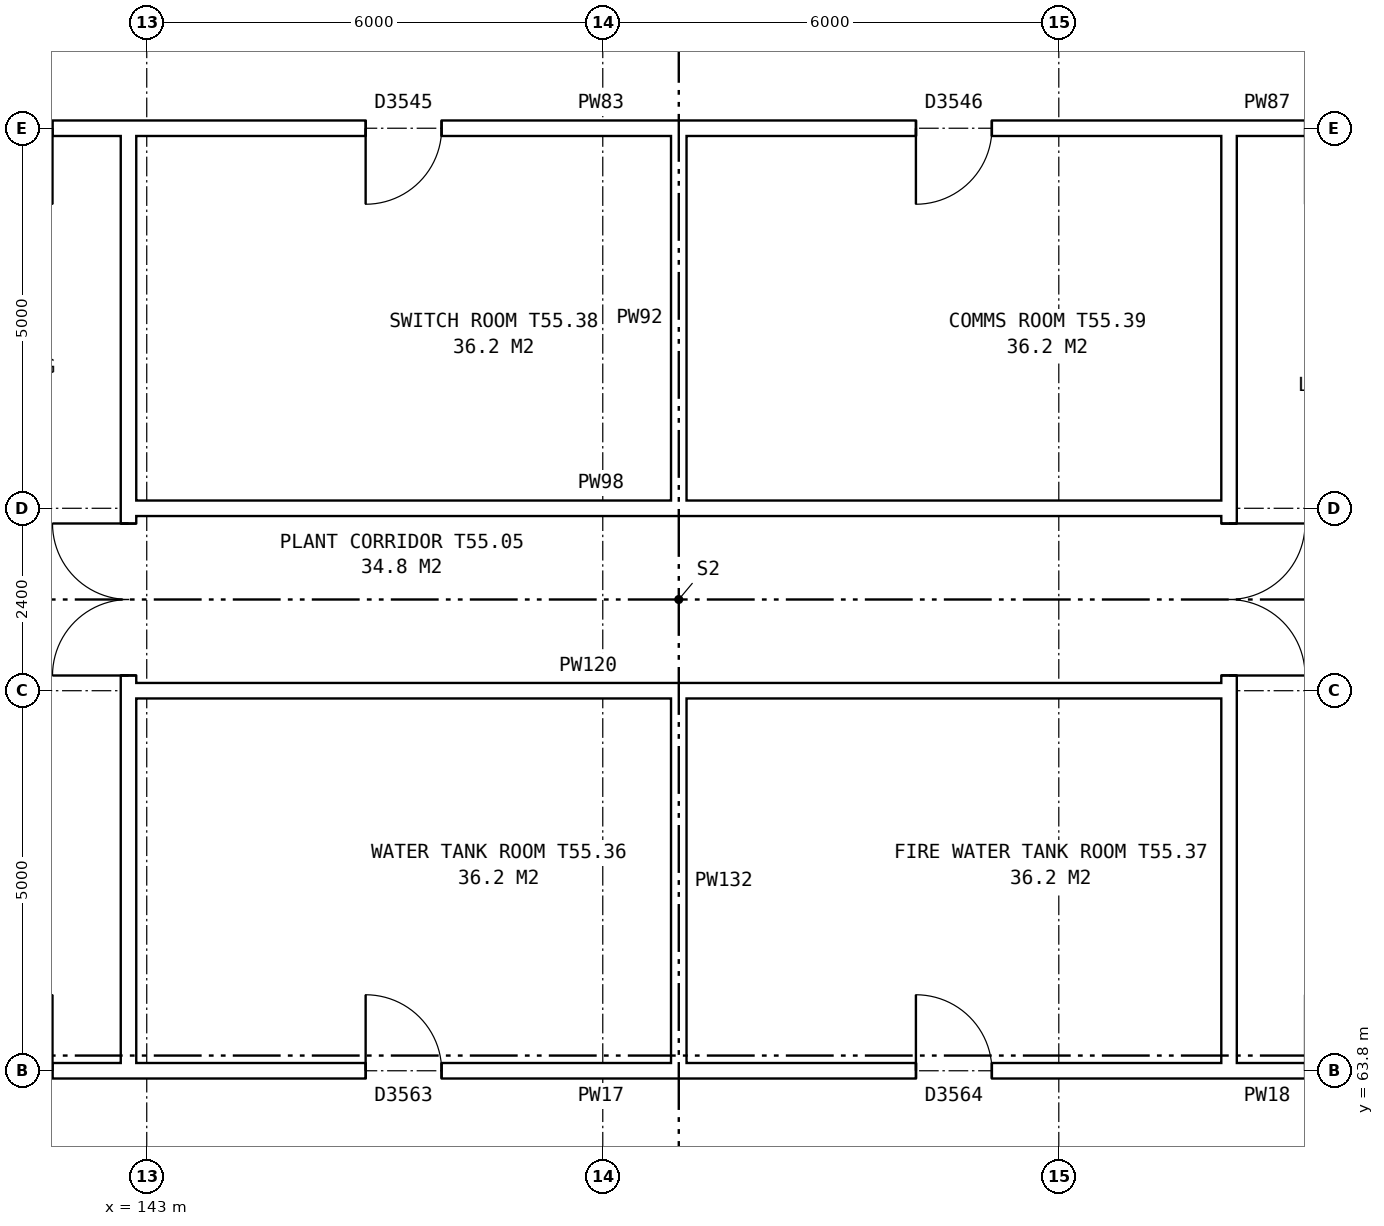
"""IFC4 building model, lengths in metres.
Left out: names, types, materials, properties, quantities, classifications, styles, units other than length and angle.
Written with IfcOpenShell. Run it as: python <this file> out.ifc"""

import sys

from ifc_helpers import new_model, si_unit, direction, frame, frame_2d, origin, place, context, subcontext, project, spatial, rectangle, extrude, element, fill, save


model = new_model("IFC4")
c1 = context("Model", 3, precision=1e-05, world=origin(), true_north=direction((0.0, 1.0)))
c2 = subcontext(c1, "Body", "Model", "MODEL_VIEW")
j1 = project(units=[si_unit("LENGTHUNIT", "METRE"), si_unit("PLANEANGLEUNIT", "RADIAN")], contexts=[c1])
p1 = place(None, origin())
s1 = spatial("IfcSite", under=j1, at=p1, CompositionType="ELEMENT")
p2 = place(p1, origin())
s2 = spatial("IfcBuilding", under=s1, at=p2, CompositionType="ELEMENT")
p3 = place(p2, frame((0.0, 0.0, 194.4)))
s3 = spatial("IfcBuildingStorey", under=s2, at=p3, CompositionType="ELEMENT", Elevation=194.4)
p4 = place(p3, frame((142.76, 63.9, 0.0), z_axis=(0.0, 0.0, 1.0), x_axis=(0.0, 1.0, 0.0)))
e1 = element("IfcWall", 1, at=p4, inside=s3, PredefinedType="PARTITIONING", context=c2, shape_type="SweptSolid", body=[
    extrude(rectangle(XDim=12.2, YDim=0.2, at=frame_2d((6.1, 0.0))), origin(), (0.0, 0.0, 1.0), 3.95),
])
p5 = place(p4, frame((5.1, 0.0, 0.0)))
e2 = element("IfcOpeningElement", 2, at=p5, cuts=e1, PredefinedType="OPENING", context=c2, shape_type="SweptSolid", body=[
    extrude(rectangle(XDim=2.0, YDim=2.1, at=frame_2d((1.0, 1.05))), frame((0.0, 0.11, 0.0), z_axis=(0.0, -1.0, 0.0), x_axis=(1.0, 0.0, 0.0)), (0.0, 0.0, 1.0), 0.22),
])
p6 = place(p3, frame((157.24, 63.9, 0.0), z_axis=(0.0, 0.0, 1.0), x_axis=(0.0, 1.0, 0.0)))
e3 = element("IfcWall", 3, at=p6, inside=s3, PredefinedType="PARTITIONING", context=c2, shape_type="SweptSolid", body=[
    extrude(rectangle(XDim=12.2, YDim=0.2, at=frame_2d((6.1, 0.0))), origin(), (0.0, 0.0, 1.0), 3.95),
])
p7 = place(p6, frame((5.1, 0.0, 0.0)))
e4 = element("IfcOpeningElement", 4, at=p7, cuts=e3, PredefinedType="OPENING", context=c2, shape_type="SweptSolid", body=[
    extrude(rectangle(XDim=2.0, YDim=2.1, at=frame_2d((1.0, 1.05))), frame((0.0, 0.11, 0.0), z_axis=(0.0, -1.0, 0.0), x_axis=(1.0, 0.0, 0.0)), (0.0, 0.0, 1.0), 0.22),
])
p8 = place(p3, frame((142.76, 63.8, 0.0), z_axis=(0.0, 0.0, 1.0), x_axis=(1.0, 0.0, 0.0)))
e5 = element("IfcWall", 5, at=p8, inside=s3, PredefinedType="PARTITIONING", context=c2, shape_type="SweptSolid", body=[
    extrude(rectangle(XDim=14.48, YDim=0.2, at=frame_2d((7.24, 0.0))), origin(), (0.0, 0.0, 1.0), 3.95),
])
p9 = place(p8, frame((3.12, 0.0, 0.0)))
e6 = element("IfcOpeningElement", 6, at=p9, cuts=e5, PredefinedType="OPENING", context=c2, shape_type="SweptSolid", body=[
    extrude(rectangle(XDim=1.0, YDim=2.1, at=frame_2d((0.5, 1.05))), frame((0.0, 0.11, 0.0), z_axis=(0.0, -1.0, 0.0), x_axis=(1.0, 0.0, 0.0)), (0.0, 0.0, 1.0), 0.22),
])
p10 = place(p8, frame((10.36, 0.0, 0.0)))
e7 = element("IfcOpeningElement", 7, at=p10, cuts=e5, PredefinedType="OPENING", context=c2, shape_type="SweptSolid", body=[
    extrude(rectangle(XDim=1.0, YDim=2.1, at=frame_2d((0.5, 1.05))), frame((0.0, 0.11, 0.0), z_axis=(0.0, -1.0, 0.0), x_axis=(1.0, 0.0, 0.0)), (0.0, 0.0, 1.0), 0.22),
])
p11 = place(p3, frame((139.76, 63.8, 0.0), z_axis=(0.0, 0.0, 1.0), x_axis=(1.0, 0.0, 0.0)))
e8 = element("IfcWall", 8, at=p11, inside=s3, PredefinedType="PARTITIONING", context=c2, shape_type="SweptSolid", body=[
    extrude(rectangle(XDim=3.0, YDim=0.2, at=frame_2d((1.5, 0.0))), origin(), (0.0, 0.0, 1.0), 3.95),
])
p12 = place(p11, frame((1.0, 0.0, 0.0)))
e9 = element("IfcOpeningElement", 9, at=p12, cuts=e8, PredefinedType="OPENING", context=c2, shape_type="SweptSolid", body=[
    extrude(rectangle(XDim=1.0, YDim=2.1, at=frame_2d((0.5, 1.05))), frame((0.0, 0.11, 0.0), z_axis=(0.0, -1.0, 0.0), x_axis=(1.0, 0.0, 0.0)), (0.0, 0.0, 1.0), 0.22),
])
p13 = place(p3, frame((157.24, 63.8, 0.0), z_axis=(0.0, 0.0, 1.0), x_axis=(1.0, 0.0, 0.0)))
e10 = element("IfcWall", 10, at=p13, inside=s3, PredefinedType="PARTITIONING", context=c2, shape_type="SweptSolid", body=[
    extrude(rectangle(XDim=3.0, YDim=0.2, at=frame_2d((1.5, 0.0))), origin(), (0.0, 0.0, 1.0), 3.95),
])
p14 = place(p13, frame((1.0, 0.0, 0.0)))
e11 = element("IfcOpeningElement", 11, at=p14, cuts=e10, PredefinedType="OPENING", context=c2, shape_type="SweptSolid", body=[
    extrude(rectangle(XDim=1.0, YDim=2.1, at=frame_2d((0.5, 1.05))), frame((0.0, 0.11, 0.0), z_axis=(0.0, -1.0, 0.0), x_axis=(1.0, 0.0, 0.0)), (0.0, 0.0, 1.0), 0.22),
])
for number, where, z_axis, x_axis in (
    (12, (142.76, 68.8, 0.0), (0.0, 0.0, 1.0), (1.0, 0.0, 0.0)),
    (13, (142.76, 71.2, 0.0), (0.0, 0.0, 1.0), (1.0, 0.0, 0.0)),
):
    element("IfcWall", number, at=place(p3, frame(where, z_axis=z_axis, x_axis=x_axis)), inside=s3, PredefinedType="PARTITIONING", context=c2, shape_type="SweptSolid", body=[
        extrude(rectangle(XDim=14.48, YDim=0.2, at=frame_2d((7.24, 0.0))), origin(), (0.0, 0.0, 1.0), 3.95),
    ])
p15 = place(p3, frame((142.76, 76.2, 0.0), z_axis=(0.0, 0.0, 1.0), x_axis=(1.0, 0.0, 0.0)))
e14 = element("IfcWall", 14, at=p15, inside=s3, PredefinedType="PARTITIONING", context=c2, shape_type="SweptSolid", body=[
    extrude(rectangle(XDim=14.48, YDim=0.2, at=frame_2d((7.24, 0.0))), origin(), (0.0, 0.0, 1.0), 3.95),
])
p16 = place(p15, frame((3.12, 0.0, 0.0)))
e15 = element("IfcOpeningElement", 15, at=p16, cuts=e14, PredefinedType="OPENING", context=c2, shape_type="SweptSolid", body=[
    extrude(rectangle(XDim=1.0, YDim=2.1, at=frame_2d((0.5, 1.05))), frame((0.0, 0.11, 0.0), z_axis=(0.0, -1.0, 0.0), x_axis=(1.0, 0.0, 0.0)), (0.0, 0.0, 1.0), 0.22),
])
p17 = place(p15, frame((10.36, 0.0, 0.0)))
e16 = element("IfcOpeningElement", 16, at=p17, cuts=e14, PredefinedType="OPENING", context=c2, shape_type="SweptSolid", body=[
    extrude(rectangle(XDim=1.0, YDim=2.1, at=frame_2d((0.5, 1.05))), frame((0.0, 0.11, 0.0), z_axis=(0.0, -1.0, 0.0), x_axis=(1.0, 0.0, 0.0)), (0.0, 0.0, 1.0), 0.22),
])
p18 = place(p3, frame((139.76, 76.2, 0.0), z_axis=(0.0, 0.0, 1.0), x_axis=(1.0, 0.0, 0.0)))
e17 = element("IfcWall", 17, at=p18, inside=s3, PredefinedType="PARTITIONING", context=c2, shape_type="SweptSolid", body=[
    extrude(rectangle(XDim=3.0, YDim=0.2, at=frame_2d((1.5, 0.0))), origin(), (0.0, 0.0, 1.0), 3.95),
])
p19 = place(p18, frame((1.0, 0.0, 0.0)))
e18 = element("IfcOpeningElement", 18, at=p19, cuts=e17, PredefinedType="OPENING", context=c2, shape_type="SweptSolid", body=[
    extrude(rectangle(XDim=1.0, YDim=2.1, at=frame_2d((0.5, 1.05))), frame((0.0, 0.11, 0.0), z_axis=(0.0, -1.0, 0.0), x_axis=(1.0, 0.0, 0.0)), (0.0, 0.0, 1.0), 0.22),
])
p20 = place(p3, frame((157.24, 76.2, 0.0), z_axis=(0.0, 0.0, 1.0), x_axis=(1.0, 0.0, 0.0)))
e19 = element("IfcWall", 19, at=p20, inside=s3, PredefinedType="PARTITIONING", context=c2, shape_type="SweptSolid", body=[
    extrude(rectangle(XDim=3.0, YDim=0.2, at=frame_2d((1.5, 0.0))), origin(), (0.0, 0.0, 1.0), 3.95),
])
p21 = place(p20, frame((1.0, 0.0, 0.0)))
e20 = element("IfcOpeningElement", 20, at=p21, cuts=e19, PredefinedType="OPENING", context=c2, shape_type="SweptSolid", body=[
    extrude(rectangle(XDim=1.0, YDim=2.1, at=frame_2d((0.5, 1.05))), frame((0.0, 0.11, 0.0), z_axis=(0.0, -1.0, 0.0), x_axis=(1.0, 0.0, 0.0)), (0.0, 0.0, 1.0), 0.22),
])
for number, where, z_axis, x_axis in (
    (21, (150.0, 63.7, 0.0), (0.0, 0.0, 1.0), (0.0, 1.0, 0.0)),
    (22, (150.0, 71.1, 0.0), (0.0, 0.0, 1.0), (0.0, 1.0, 0.0)),
):
    element("IfcWall", number, at=place(p3, frame(where, z_axis=z_axis, x_axis=x_axis)), inside=s3, PredefinedType="PARTITIONING", context=c2, shape_type="SweptSolid", body=[
        extrude(rectangle(XDim=5.2, YDim=0.2, at=frame_2d((2.6, 0.0))), origin(), (0.0, 0.0, 1.0), 3.95),
    ])
p22 = place(p5, origin())
e23 = element("IfcDoor", 23, at=p22, inside=s3, OperationType="DOUBLE_DOOR_SINGLE_SWING", PredefinedType="DOOR", context=c2, shape_type="SweptSolid", body=[
    extrude(rectangle(XDim=2.0, YDim=2.1, at=frame_2d((1.0, 1.05))), frame((0.0, 0.025, 0.0), z_axis=(0.0, -1.0, 0.0), x_axis=(1.0, 0.0, 0.0)), (0.0, 0.0, 1.0), 0.05),
])
fill(e2, e23)
p23 = place(p7, frame((2.0, 0.0, 0.0), z_axis=(0.0, 0.0, 1.0), x_axis=(-1.0, 0.0, 0.0)))
e24 = element("IfcDoor", 24, at=p23, inside=s3, OperationType="DOUBLE_DOOR_SINGLE_SWING", PredefinedType="DOOR", context=c2, shape_type="SweptSolid", body=[
    extrude(rectangle(XDim=2.0, YDim=2.1, at=frame_2d((1.0, 1.05))), frame((0.0, 0.025, 0.0), z_axis=(0.0, -1.0, 0.0), x_axis=(1.0, 0.0, 0.0)), (0.0, 0.0, 1.0), 0.05),
])
fill(e4, e24)
p24 = place(p9, origin())
e25 = element("IfcDoor", 25, at=p24, inside=s3, OperationType="SINGLE_SWING_LEFT", PredefinedType="DOOR", context=c2, shape_type="SweptSolid", body=[
    extrude(rectangle(XDim=1.0, YDim=2.1, at=frame_2d((0.5, 1.05))), frame((0.0, 0.025, 0.0), z_axis=(0.0, -1.0, 0.0), x_axis=(1.0, 0.0, 0.0)), (0.0, 0.0, 1.0), 0.05),
])
fill(e6, e25)
p25 = place(p10, origin())
e26 = element("IfcDoor", 26, at=p25, inside=s3, OperationType="SINGLE_SWING_LEFT", PredefinedType="DOOR", context=c2, shape_type="SweptSolid", body=[
    extrude(rectangle(XDim=1.0, YDim=2.1, at=frame_2d((0.5, 1.05))), frame((0.0, 0.025, 0.0), z_axis=(0.0, -1.0, 0.0), x_axis=(1.0, 0.0, 0.0)), (0.0, 0.0, 1.0), 0.05),
])
fill(e7, e26)
p26 = place(p16, frame((1.0, 0.0, 0.0), z_axis=(0.0, 0.0, 1.0), x_axis=(-1.0, 0.0, 0.0)))
e27 = element("IfcDoor", 27, at=p26, inside=s3, OperationType="SINGLE_SWING_RIGHT", PredefinedType="DOOR", context=c2, shape_type="SweptSolid", body=[
    extrude(rectangle(XDim=1.0, YDim=2.1, at=frame_2d((0.5, 1.05))), frame((0.0, 0.025, 0.0), z_axis=(0.0, -1.0, 0.0), x_axis=(1.0, 0.0, 0.0)), (0.0, 0.0, 1.0), 0.05),
])
fill(e15, e27)
p27 = place(p17, frame((1.0, 0.0, 0.0), z_axis=(0.0, 0.0, 1.0), x_axis=(-1.0, 0.0, 0.0)))
e28 = element("IfcDoor", 28, at=p27, inside=s3, OperationType="SINGLE_SWING_RIGHT", PredefinedType="DOOR", context=c2, shape_type="SweptSolid", body=[
    extrude(rectangle(XDim=1.0, YDim=2.1, at=frame_2d((0.5, 1.05))), frame((0.0, 0.025, 0.0), z_axis=(0.0, -1.0, 0.0), x_axis=(1.0, 0.0, 0.0)), (0.0, 0.0, 1.0), 0.05),
])
fill(e16, e28)
save(model, sys.argv[1])
